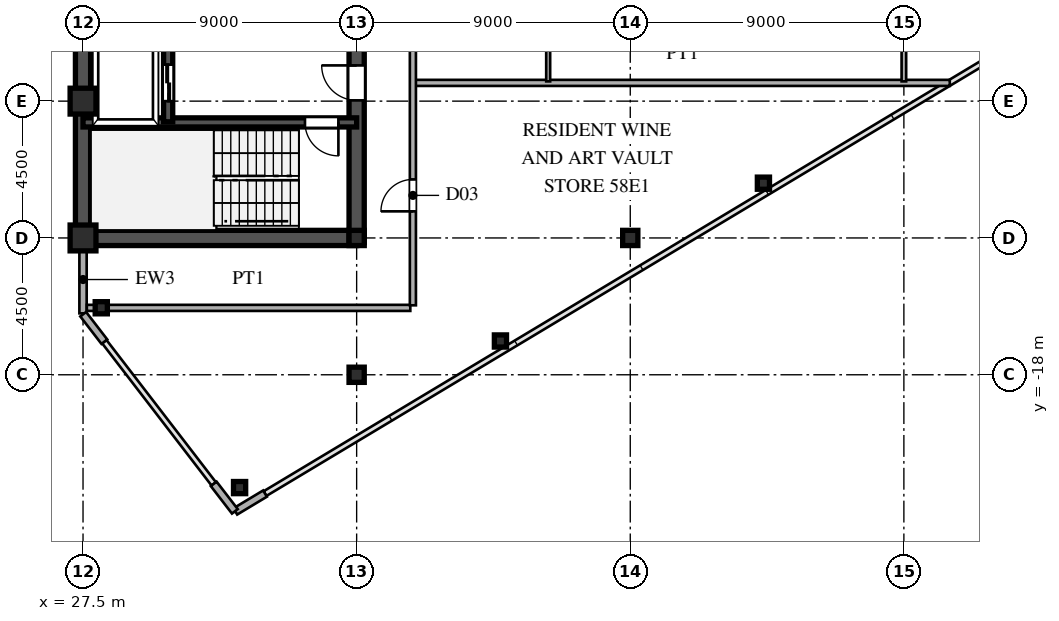
"""IFC4 building model, lengths in metres.
Left out: names, types, materials, properties, quantities, classifications, styles, units other than length and angle.
Written with IfcOpenShell. Run it as: python <this file> out.ifc"""

import sys

from ifc_helpers import new_model, si_unit, direction, frame, frame_2d, origin, origin_2d, place, context, subcontext, project, spatial, rectangle, hollow_rectangle, i_section, extrude, source, transform, mapped, element, fill, save


model = new_model("IFC4")
c1 = context("Model", 3, precision=1e-05, world=origin(), true_north=direction((0.0, 1.0)))
c2 = subcontext(c1, "Body", "Model", "MODEL_VIEW")
j1 = project(units=[si_unit("LENGTHUNIT", "METRE"), si_unit("PLANEANGLEUNIT", "RADIAN")], contexts=[c1])
p1 = place(None, origin())
s1 = spatial("IfcSite", under=j1, at=p1, CompositionType="ELEMENT")
p2 = place(p1, origin())
s2 = spatial("IfcBuilding", under=s1, at=p2, CompositionType="ELEMENT")
p3 = place(p2, frame((0.0, 0.0, 217.5)))
s3 = spatial("IfcBuildingStorey", under=s2, at=p3, CompositionType="ELEMENT", Elevation=217.5)
m1 = source(origin(), c2, "Body", "SweptSolid", [
    extrude(hollow_rectangle(XDim=0.85, YDim=0.85, WallThickness=0.036, at=origin_2d()), origin(), (0.0, 0.0, 1.0), 3.6),
])
for number, where, z_axis, x_axis in (
    (1, (27.5, -13.5, 0.0), (0.0, 0.0, 1.0), (1.0, 0.0, 0.0)),
    (2, (27.5, -9.0, 0.0), (0.0, 0.0, 1.0), (1.0, 0.0, 0.0)),
):
    element("IfcColumn", number, at=place(p3, frame(where, z_axis=z_axis, x_axis=x_axis)), inside=s3, PredefinedType="COLUMN", context=c2, shape_type="MappedRepresentation", body=[
        mapped(m1, transform((0.0, 0.0, 0.0), scale=1.0)),
    ])
m2 = source(origin(), c2, "Body", "SweptSolid", [
    extrude(i_section(OverallWidth=0.5, OverallDepth=0.5, WebThickness=0.02, FlangeThickness=0.032, at=origin_2d()), origin(), (0.0, 0.0, 1.0), 3.6),
])
for number, where, z_axis, x_axis in (
    (3, (36.5, -18.0, 0.0), (0.0, 0.0, 1.0), (1.0, 0.0, 0.0)),
    (4, (36.5, -13.5, 0.0), (0.0, 0.0, 1.0), (1.0, 0.0, 0.0)),
    (5, (45.5, -13.5, 0.0), (0.0, 0.0, 1.0), (1.0, 0.0, 0.0)),
):
    element("IfcColumn", number, at=place(p3, frame(where, z_axis=z_axis, x_axis=x_axis)), inside=s3, PredefinedType="COLUMN", context=c2, shape_type="MappedRepresentation", body=[
        mapped(m2, transform((0.0, 0.0, 0.0), scale=1.0)),
    ])
m3 = source(origin(), c2, "Body", "SweptSolid", [
    extrude(hollow_rectangle(XDim=0.4, YDim=0.4, WallThickness=0.016, at=origin_2d()), origin(), (0.0, 0.0, 1.0), 3.6),
])
for number, where, z_axis, x_axis in (
    (6, (32.65, -21.71, 0.0), (0.0, 0.0, 1.0), (1.0, 0.0, 0.0)),
    (7, (28.1, -15.796, 0.0), (0.0, 0.0, 1.0), (1.0, 0.0, 0.0)),
    (8, (41.23, -16.889, 0.0), (0.0, 0.0, 1.0), (1.0, 0.0, 0.0)),
    (9, (49.88, -11.699, 0.0), (0.0, 0.0, 1.0), (1.0, 0.0, 0.0)),
):
    element("IfcColumn", number, at=place(p3, frame(where, z_axis=z_axis, x_axis=x_axis)), inside=s3, PredefinedType="COLUMN", context=c2, shape_type="MappedRepresentation", body=[
        mapped(m3, transform((0.0, 0.0, 0.0), scale=1.0)),
    ])
p4 = place(p3, frame((32.509, -22.495, 0.0), z_axis=(0.0, 0.0, 1.0), x_axis=(0.85743623509, 0.514590228002, 0.0)))
e10 = element("IfcWall", 10, at=p4, inside=s3, PredefinedType="SOLIDWALL", context=c2, shape_type="SweptSolid", body=[
    extrude(rectangle(XDim=1.14, YDim=0.24, at=frame_2d((0.57, 0.0))), origin(), (0.0, 0.0, 1.0), 3.38),
])
p5 = place(p3, frame((27.5, -15.98, 0.0), z_axis=(0.0, 0.0, 1.0), x_axis=(0.0, 1.0, 0.0)))
e11 = element("IfcWall", 11, at=p5, inside=s3, PredefinedType="SOLIDWALL", context=c2, shape_type="SweptSolid", body=[
    extrude(rectangle(XDim=1.605, YDim=0.24, at=frame_2d((0.803, 0.0))), origin(), (0.0, 0.0, 1.0), 3.38),
])
p6 = place(p3, frame((27.5, -14.375, 0.0), z_axis=(0.0, 0.0, 1.0), x_axis=(0.0, 1.0, 0.0)))
e12 = element("IfcWall", 12, at=p6, inside=s3, PredefinedType="SOLIDWALL", context=c2, shape_type="SweptSolid", body=[
    extrude(rectangle(XDim=0.62, YDim=0.24, at=frame_2d((0.31, 0.0))), origin(), (0.0, 0.0, 1.0), 2.88),
])
for number, where, z_axis, x_axis in (
    (13, (27.506, -16.008, 0.0), (0.0, 0.0, 1.0), (0.61, -0.793, 0.0)),
    (14, (31.799, -21.588, 0.0), (0.0, 0.0, 1.0), (0.61, -0.793, 0.0)),
):
    element("IfcWall", number, at=place(p3, frame(where, z_axis=z_axis, x_axis=x_axis)), inside=s3, PredefinedType="SOLIDWALL", context=c2, shape_type="SweptSolid", body=[
        extrude(rectangle(XDim=1.14, YDim=0.24, at=frame_2d((0.57, 0.0))), origin(), (0.0, 0.0, 1.0), 3.38),
    ])
p7 = place(p3, frame((27.5, -13.5, 0.0), z_axis=(0.0, 0.0, 1.0), x_axis=(0.0, 1.0, 0.0)))
e15 = element("IfcWall", 15, at=p7, inside=s3, PredefinedType="SHEAR", context=c2, shape_type="SweptSolid", body=[
    extrude(rectangle(XDim=12.2, YDim=0.5, at=frame_2d((6.1, 0.0))), origin(), (0.0, 0.0, 1.0), 3.38),
])
p8 = place(p3, frame((27.5, -13.5, 0.0), z_axis=(0.0, 0.0, 1.0), x_axis=(1.0, 0.0, 0.0)))
e16 = element("IfcWall", 16, at=p8, inside=s3, PredefinedType="SHEAR", context=c2, shape_type="SweptSolid", body=[
    extrude(rectangle(XDim=9.0, YDim=0.5, at=frame_2d((4.5, 0.0))), origin(), (0.0, 0.0, 1.0), 3.38),
])
p9 = place(p3, frame((36.5, -13.65, 0.0), z_axis=(0.0, 0.0, 1.0), x_axis=(0.0, 1.0, 0.0)))
e17 = element("IfcWall", 17, at=p9, inside=s3, PredefinedType="SHEAR", context=c2, shape_type="SweptSolid", body=[
    extrude(rectangle(XDim=7.15, YDim=0.5, at=frame_2d((3.575, 0.0))), origin(), (0.0, 0.0, 1.0), 3.38),
])
p10 = place(p9, frame((4.675, 0.0, 0.0)))
e18 = element("IfcOpeningElement", 18, at=p10, cuts=e17, PredefinedType="OPENING", context=c2, shape_type="SweptSolid", body=[
    extrude(rectangle(XDim=1.15, YDim=2.2, at=frame_2d((0.575, 1.1))), frame((0.0, 0.26, 0.0), z_axis=(0.0, -1.0, 0.0), x_axis=(1.0, 0.0, 0.0)), (0.0, 0.0, 1.0), 0.52),
])
p11 = place(p3, frame((27.5, -9.7, 0.0), z_axis=(0.0, 0.0, 1.0), x_axis=(1.0, 0.0, 0.0)))
e19 = element("IfcWall", 19, at=p11, inside=s3, PredefinedType="SHEAR", context=c2, shape_type="SweptSolid", body=[
    extrude(rectangle(XDim=9.0, YDim=0.3, at=frame_2d((4.5, 0.0))), origin(), (0.0, 0.0, 1.0), 3.38),
])
p12 = place(p11, frame((7.3, 0.0, 0.0)))
e20 = element("IfcOpeningElement", 20, at=p12, cuts=e19, PredefinedType="OPENING", context=c2, shape_type="SweptSolid", body=[
    extrude(rectangle(XDim=1.1, YDim=2.2, at=frame_2d((0.55, 1.1))), frame((0.0, 0.16, 0.0), z_axis=(0.0, -1.0, 0.0), x_axis=(1.0, 0.0, 0.0)), (0.0, 0.0, 1.0), 0.32),
])
p13 = place(p3, frame((30.3, -9.68, 0.0), z_axis=(0.0, 0.0, 1.0), x_axis=(0.0, 1.0, 0.0)))
e21 = element("IfcWall", 21, at=p13, inside=s3, PredefinedType="SHEAR", context=c2, shape_type="SweptSolid", body=[
    extrude(rectangle(XDim=2.56, YDim=0.3, at=frame_2d((1.28, 0.0))), origin(), (0.0, 0.0, 1.0), 3.38),
])
p14 = place(p13, frame((0.68, 0.0, 0.0)))
e22 = element("IfcOpeningElement", 22, at=p14, cuts=e21, PredefinedType="OPENING", context=c2, shape_type="SweptSolid", body=[
    extrude(rectangle(XDim=1.2, YDim=2.25, at=frame_2d((0.6, 1.125))), frame((0.0, 0.16, 0.0), z_axis=(0.0, -1.0, 0.0), x_axis=(1.0, 0.0, 0.0)), (0.0, 0.0, 1.0), 0.32),
])
p15 = place(p3, frame((27.625, -15.8, 0.0), z_axis=(0.0, 0.0, 1.0), x_axis=(1.0, 0.0, 0.0)))
e23 = element("IfcWall", 23, at=p15, inside=s3, PredefinedType="PARTITIONING", context=c2, shape_type="SweptSolid", body=[
    extrude(rectangle(XDim=10.64, YDim=0.2, at=frame_2d((5.32, 0.0))), origin(), (0.0, 0.0, 1.0), 3.38),
])
p16 = place(p3, frame((38.43, -8.4, 0.0), z_axis=(0.0, 0.0, 1.0), x_axis=(1.0, 0.0, 0.0)))
e24 = element("IfcWall", 24, at=p16, inside=s3, PredefinedType="PARTITIONING", context=c2, shape_type="SweptSolid", body=[
    extrude(rectangle(XDim=17.58, YDim=0.2, at=frame_2d((8.79, 0.0))), origin(), (0.0, 0.0, 1.0), 3.38),
])
p17 = place(p3, frame((38.35, -15.715, 0.0), z_axis=(0.0, 0.0, 1.0), x_axis=(0.0, 1.0, 0.0)))
e25 = element("IfcWall", 25, at=p17, inside=s3, PredefinedType="PARTITIONING", context=c2, shape_type="SweptSolid", body=[
    extrude(rectangle(XDim=31.43, YDim=0.2, at=frame_2d((15.715, 0.0))), origin(), (0.0, 0.0, 1.0), 3.38),
])
p18 = place(p17, frame((3.09, 0.0, 0.0)))
e26 = element("IfcOpeningElement", 26, at=p18, cuts=e25, PredefinedType="OPENING", context=c2, shape_type="SweptSolid", body=[
    extrude(rectangle(XDim=1.05, YDim=2.25, at=frame_2d((0.525, 1.125))), frame((0.0, 0.11, 0.0), z_axis=(0.0, -1.0, 0.0), x_axis=(1.0, 0.0, 0.0)), (0.0, 0.0, 1.0), 0.22),
])
p19 = place(p17, frame((13.289, 0.0, 0.0)))
e27 = element("IfcOpeningElement", 27, at=p19, cuts=e25, PredefinedType="OPENING", context=c2, shape_type="SweptSolid", body=[
    extrude(rectangle(XDim=1.05, YDim=2.25, at=frame_2d((0.525, 1.125))), frame((0.0, 0.11, 0.0), z_axis=(0.0, -1.0, 0.0), x_axis=(1.0, 0.0, 0.0)), (0.0, 0.0, 1.0), 0.22),
])
p20 = place(p17, frame((25.59, 0.0, 0.0)))
e28 = element("IfcOpeningElement", 28, at=p20, cuts=e25, PredefinedType="OPENING", context=c2, shape_type="SweptSolid", body=[
    extrude(rectangle(XDim=1.05, YDim=2.25, at=frame_2d((0.525, 1.125))), frame((0.0, 0.11, 0.0), z_axis=(0.0, -1.0, 0.0), x_axis=(1.0, 0.0, 0.0)), (0.0, 0.0, 1.0), 0.22),
])
p21 = place(p3, frame((42.8, -8.35, 0.0), z_axis=(0.0, 0.0, 1.0), x_axis=(0.0, 1.0, 0.0)))
e29 = element("IfcWall", 29, at=p21, inside=s3, PredefinedType="PARTITIONING", context=c2, shape_type="SweptSolid", body=[
    extrude(rectangle(XDim=8.833, YDim=0.13, at=frame_2d((4.417, 0.0))), origin(), (0.0, 0.0, 1.0), 3.38),
])
p22 = place(p21, frame((6.175, 0.0, 0.0)))
e30 = element("IfcOpeningElement", 30, at=p22, cuts=e29, PredefinedType="OPENING", context=c2, shape_type="SweptSolid", body=[
    extrude(rectangle(XDim=0.95, YDim=2.15, at=frame_2d((0.475, 1.075))), frame((0.0, 0.075, 0.0), z_axis=(0.0, -1.0, 0.0), x_axis=(1.0, 0.0, 0.0)), (0.0, 0.0, 1.0), 0.15),
])
p23 = place(p3, frame((54.5, -8.35, 0.0), z_axis=(0.0, 0.0, 1.0), x_axis=(0.0, 1.0, 0.0)))
e31 = element("IfcWall", 31, at=p23, inside=s3, PredefinedType="PARTITIONING", context=c2, shape_type="SweptSolid", body=[
    extrude(rectangle(XDim=13.3, YDim=0.15, at=frame_2d((6.65, 0.0))), origin(), (0.0, 0.0, 1.0), 2.78),
])
p24 = place(p23, frame((6.175, 0.0, 0.0)))
e32 = element("IfcOpeningElement", 32, at=p24, cuts=e31, PredefinedType="OPENING", context=c2, shape_type="SweptSolid", body=[
    extrude(rectangle(XDim=0.95, YDim=2.15, at=frame_2d((0.475, 1.075))), frame((0.0, 0.085, 0.0), z_axis=(0.0, -1.0, 0.0), x_axis=(1.0, 0.0, 0.0)), (0.0, 0.0, 1.0), 0.17),
])
m4 = source(origin(), c2, "Body", "SweptSolid", [
    extrude(rectangle(XDim=1.15, YDim=2.2, at=frame_2d((0.575, 1.1))), frame((0.0, 0.025, 0.0), z_axis=(0.0, -1.0, 0.0), x_axis=(1.0, 0.0, 0.0)), (0.0, 0.0, 1.0), 0.05),
])
p25 = place(p10, origin())
e33 = element("IfcDoor", 33, at=p25, inside=s3, OperationType="SINGLE_SWING_RIGHT", PredefinedType="DOOR", context=c2, shape_type="MappedRepresentation", body=[
    mapped(m4, transform((0.0, 0.0, 0.0), scale=1.0)),
])
fill(e18, e33)
m5 = source(origin(), c2, "Body", "SweptSolid", [
    extrude(rectangle(XDim=1.1, YDim=2.2, at=frame_2d((0.55, 1.1))), frame((0.0, 0.025, 0.0), z_axis=(0.0, -1.0, 0.0), x_axis=(1.0, 0.0, 0.0)), (0.0, 0.0, 1.0), 0.05),
])
p26 = place(p12, frame((1.1, 0.0, 0.0), z_axis=(0.0, 0.0, 1.0), x_axis=(-1.0, 0.0, 0.0)))
e34 = element("IfcDoor", 34, at=p26, inside=s3, OperationType="SINGLE_SWING_RIGHT", PredefinedType="DOOR", context=c2, shape_type="MappedRepresentation", body=[
    mapped(m5, transform((0.0, 0.0, 0.0), scale=1.0)),
])
fill(e20, e34)
m6 = source(origin(), c2, "Body", "SweptSolid", [
    extrude(rectangle(XDim=1.2, YDim=2.25, at=frame_2d((0.6, 1.125))), frame((0.0, 0.025, 0.0), z_axis=(0.0, -1.0, 0.0), x_axis=(1.0, 0.0, 0.0)), (0.0, 0.0, 1.0), 0.05),
])
p27 = place(p14, origin())
e35 = element("IfcDoor", 35, at=p27, inside=s3, OperationType="DOUBLE_DOOR_SLIDING", PredefinedType="DOOR", context=c2, shape_type="MappedRepresentation", body=[
    mapped(m6, transform((0.0, 0.0, 0.0), scale=1.0)),
])
fill(e22, e35)
m7 = source(origin(), c2, "Body", "SweptSolid", [
    extrude(rectangle(XDim=1.05, YDim=2.25, at=frame_2d((0.525, 1.125))), frame((0.0, 0.025, 0.0), z_axis=(0.0, -1.0, 0.0), x_axis=(1.0, 0.0, 0.0)), (0.0, 0.0, 1.0), 0.05),
])
p28 = place(p18, origin())
e36 = element("IfcDoor", 36, at=p28, inside=s3, OperationType="SINGLE_SWING_LEFT", PredefinedType="DOOR", context=c2, shape_type="MappedRepresentation", body=[
    mapped(m7, transform((0.0, 0.0, 0.0), scale=1.0)),
])
fill(e26, e36)
save(model, sys.argv[1])
